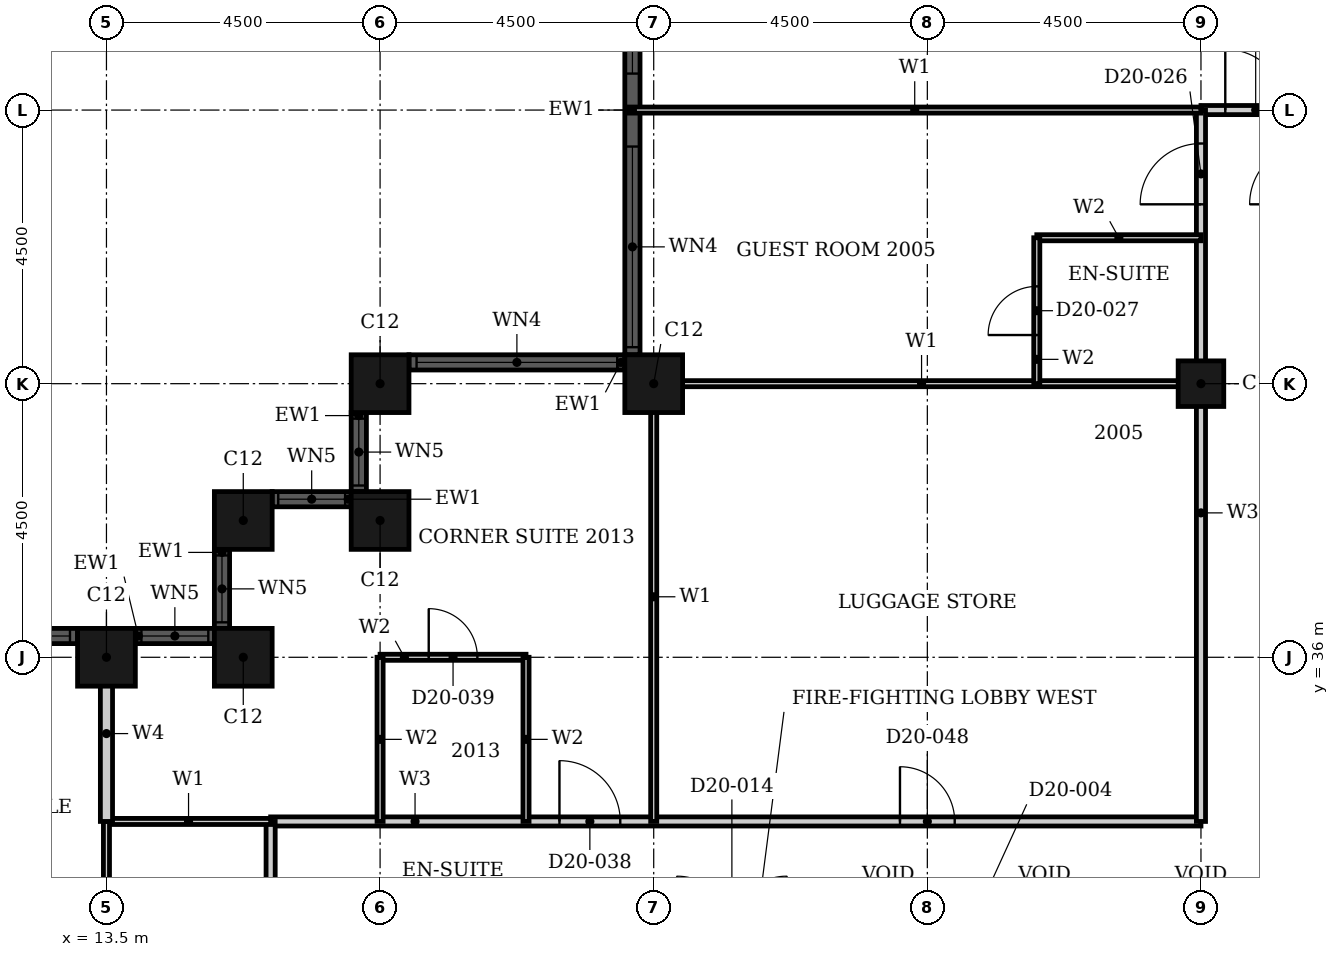
"""IFC4 building model, lengths in metres.
Left out: names, types, materials, properties, quantities, classifications, styles, units other than length and angle.
Written with IfcOpenShell. Run it as: python <this file> out.ifc"""

import sys

from ifc_helpers import new_model, si_unit, direction, frame, frame_2d, origin, origin_2d, place, context, subcontext, project, spatial, rectangle, hollow_rectangle, extrude, element, fill, save


model = new_model("IFC4")
c1 = context("Model", 3, precision=1e-05, world=origin(), true_north=direction((0.0, 1.0)))
c2 = subcontext(c1, "Body", "Model", "MODEL_VIEW")
j1 = project(units=[si_unit("LENGTHUNIT", "METRE"), si_unit("PLANEANGLEUNIT", "RADIAN")], contexts=[c1])
p1 = place(None, origin())
s1 = spatial("IfcSite", under=j1, at=p1, CompositionType="ELEMENT")
p2 = place(p1, origin())
s2 = spatial("IfcBuilding", under=s1, at=p2, CompositionType="ELEMENT")
p3 = place(p2, frame((0.0, 0.0, 85.2)))
s3 = spatial("IfcBuildingStorey", under=s2, at=p3, CompositionType="ELEMENT", Elevation=85.2)
for number, where, z_axis, x_axis in (
    (1, (22.5, 40.5, 0.0), (0.0, 0.0, 1.0), (1.0, 0.0, 0.0)),
    (2, (18.0, 40.5, 0.0), (0.0, 0.0, 1.0), (1.0, 0.0, 0.0)),
    (3, (18.0, 38.25, 0.0), (0.0, 0.0, 1.0), (1.0, 0.0, 0.0)),
    (4, (15.75, 38.25, 0.0), (0.0, 0.0, 1.0), (1.0, 0.0, 0.0)),
    (5, (15.75, 36.0, 0.0), (0.0, 0.0, 1.0), (1.0, 0.0, 0.0)),
    (6, (13.5, 36.0, 0.0), (0.0, 0.0, 1.0), (1.0, 0.0, 0.0)),
):
    element("IfcColumn", number, at=place(p3, frame(where, z_axis=z_axis, x_axis=x_axis)), inside=s3, PredefinedType="COLUMN", context=c2, shape_type="SweptSolid", body=[
        extrude(hollow_rectangle(XDim=0.95, YDim=0.95, WallThickness=0.03, at=origin_2d()), origin(), (0.0, 0.0, 1.0), 3.6),
    ])
p4 = place(p3, frame((31.5, 40.5, 0.0), z_axis=(0.0, 0.0, 1.0), x_axis=(1.0, 0.0, 0.0)))
e7 = element("IfcColumn", 7, at=p4, inside=s3, PredefinedType="COLUMN", context=c2, shape_type="SweptSolid", body=[
    extrude(hollow_rectangle(XDim=0.75, YDim=0.75, WallThickness=0.024, at=origin_2d()), origin(), (0.0, 0.0, 1.0), 3.6),
])
p5 = place(p3, frame((22.15, 49.025, 0.0), z_axis=(0.0, 0.0, 1.0), x_axis=(0.0, -1.0, 0.0)))
e8 = element("IfcWall", 8, at=p5, inside=s3, PredefinedType="SOLIDWALL", context=c2, shape_type="SweptSolid", body=[
    extrude(rectangle(XDim=8.05, YDim=0.25, at=frame_2d((4.025, 0.0))), origin(), (0.0, 0.0, 1.0), 3.6),
])
p6 = place(p5, frame((0.125, 0.0, 0.9)))
e9 = element("IfcOpeningElement", 9, at=p6, cuts=e8, PredefinedType="OPENING", context=c2, shape_type="SweptSolid", body=[
    extrude(rectangle(XDim=3.3, YDim=2.08, at=frame_2d((1.65, 1.04))), frame((0.0, 0.135, 0.0), z_axis=(0.0, -1.0, 0.0), x_axis=(1.0, 0.0, 0.0)), (0.0, 0.0, 1.0), 0.27),
])
p7 = place(p5, frame((4.625, 0.0, 0.9)))
e10 = element("IfcOpeningElement", 10, at=p7, cuts=e8, PredefinedType="OPENING", context=c2, shape_type="SweptSolid", body=[
    extrude(rectangle(XDim=3.3, YDim=2.08, at=frame_2d((1.65, 1.04))), frame((0.0, 0.135, 0.0), z_axis=(0.0, -1.0, 0.0), x_axis=(1.0, 0.0, 0.0)), (0.0, 0.0, 1.0), 0.27),
])
p8 = place(p3, frame((22.025, 40.85, 0.0), z_axis=(0.0, 0.0, 1.0), x_axis=(-1.0, 0.0, 0.0)))
e11 = element("IfcWall", 11, at=p8, inside=s3, PredefinedType="SOLIDWALL", context=c2, shape_type="SweptSolid", body=[
    extrude(rectangle(XDim=3.55, YDim=0.25, at=frame_2d((1.775, 0.0))), origin(), (0.0, 0.0, 1.0), 3.6),
])
p9 = place(p8, frame((0.125, 0.0, 0.9)))
e12 = element("IfcOpeningElement", 12, at=p9, cuts=e11, PredefinedType="OPENING", context=c2, shape_type="SweptSolid", body=[
    extrude(rectangle(XDim=3.3, YDim=2.08, at=frame_2d((1.65, 1.04))), frame((0.0, 0.135, 0.0), z_axis=(0.0, -1.0, 0.0), x_axis=(1.0, 0.0, 0.0)), (0.0, 0.0, 1.0), 0.27),
])
p10 = place(p3, frame((17.65, 40.025, 0.0), z_axis=(0.0, 0.0, 1.0), x_axis=(0.0, -1.0, 0.0)))
e13 = element("IfcWall", 13, at=p10, inside=s3, PredefinedType="SOLIDWALL", context=c2, shape_type="SweptSolid", body=[
    extrude(rectangle(XDim=1.3, YDim=0.25, at=frame_2d((0.65, 0.0))), origin(), (0.0, 0.0, 1.0), 3.6),
])
p11 = place(p10, frame((0.1, 0.0, 0.9)))
e14 = element("IfcOpeningElement", 14, at=p11, cuts=e13, PredefinedType="OPENING", context=c2, shape_type="SweptSolid", body=[
    extrude(rectangle(XDim=1.1, YDim=2.08, at=frame_2d((0.55, 1.04))), frame((0.0, 0.135, 0.0), z_axis=(0.0, -1.0, 0.0), x_axis=(1.0, 0.0, 0.0)), (0.0, 0.0, 1.0), 0.27),
])
p12 = place(p3, frame((17.525, 38.6, 0.0), z_axis=(0.0, 0.0, 1.0), x_axis=(-1.0, 0.0, 0.0)))
e15 = element("IfcWall", 15, at=p12, inside=s3, PredefinedType="SOLIDWALL", context=c2, shape_type="SweptSolid", body=[
    extrude(rectangle(XDim=1.3, YDim=0.25, at=frame_2d((0.65, 0.0))), origin(), (0.0, 0.0, 1.0), 3.6),
])
p13 = place(p12, frame((0.1, 0.0, 0.9)))
e16 = element("IfcOpeningElement", 16, at=p13, cuts=e15, PredefinedType="OPENING", context=c2, shape_type="SweptSolid", body=[
    extrude(rectangle(XDim=1.1, YDim=2.08, at=frame_2d((0.55, 1.04))), frame((0.0, 0.135, 0.0), z_axis=(0.0, -1.0, 0.0), x_axis=(1.0, 0.0, 0.0)), (0.0, 0.0, 1.0), 0.27),
])
p14 = place(p3, frame((15.4, 37.775, 0.0), z_axis=(0.0, 0.0, 1.0), x_axis=(0.0, -1.0, 0.0)))
e17 = element("IfcWall", 17, at=p14, inside=s3, PredefinedType="SOLIDWALL", context=c2, shape_type="SweptSolid", body=[
    extrude(rectangle(XDim=1.3, YDim=0.25, at=frame_2d((0.65, 0.0))), origin(), (0.0, 0.0, 1.0), 3.6),
])
p15 = place(p14, frame((0.1, 0.0, 0.9)))
e18 = element("IfcOpeningElement", 18, at=p15, cuts=e17, PredefinedType="OPENING", context=c2, shape_type="SweptSolid", body=[
    extrude(rectangle(XDim=1.1, YDim=2.08, at=frame_2d((0.55, 1.04))), frame((0.0, 0.135, 0.0), z_axis=(0.0, -1.0, 0.0), x_axis=(1.0, 0.0, 0.0)), (0.0, 0.0, 1.0), 0.27),
])
p16 = place(p3, frame((15.275, 36.35, 0.0), z_axis=(0.0, 0.0, 1.0), x_axis=(-1.0, 0.0, 0.0)))
e19 = element("IfcWall", 19, at=p16, inside=s3, PredefinedType="SOLIDWALL", context=c2, shape_type="SweptSolid", body=[
    extrude(rectangle(XDim=1.3, YDim=0.25, at=frame_2d((0.65, 0.0))), origin(), (0.0, 0.0, 1.0), 3.6),
])
p17 = place(p16, frame((0.1, 0.0, 0.9)))
e20 = element("IfcOpeningElement", 20, at=p17, cuts=e19, PredefinedType="OPENING", context=c2, shape_type="SweptSolid", body=[
    extrude(rectangle(XDim=1.1, YDim=2.08, at=frame_2d((0.55, 1.04))), frame((0.0, 0.135, 0.0), z_axis=(0.0, -1.0, 0.0), x_axis=(1.0, 0.0, 0.0)), (0.0, 0.0, 1.0), 0.27),
])
p18 = place(p3, frame((13.025, 36.35, 0.0), z_axis=(0.0, 0.0, 1.0), x_axis=(-1.0, 0.0, 0.0)))
e21 = element("IfcWall", 21, at=p18, inside=s3, PredefinedType="SOLIDWALL", context=c2, shape_type="SweptSolid", body=[
    extrude(rectangle(XDim=8.05, YDim=0.25, at=frame_2d((4.025, 0.0))), origin(), (0.0, 0.0, 1.0), 3.6),
])
p19 = place(p18, frame((0.125, 0.0, 0.9)))
e22 = element("IfcOpeningElement", 22, at=p19, cuts=e21, PredefinedType="OPENING", context=c2, shape_type="SweptSolid", body=[
    extrude(rectangle(XDim=3.3, YDim=2.08, at=frame_2d((1.65, 1.04))), frame((0.0, 0.135, 0.0), z_axis=(0.0, -1.0, 0.0), x_axis=(1.0, 0.0, 0.0)), (0.0, 0.0, 1.0), 0.27),
])
p20 = place(p18, frame((4.625, 0.0, 0.9)))
e23 = element("IfcOpeningElement", 23, at=p20, cuts=e21, PredefinedType="OPENING", context=c2, shape_type="SweptSolid", body=[
    extrude(rectangle(XDim=3.3, YDim=2.08, at=frame_2d((1.65, 1.04))), frame((0.0, 0.135, 0.0), z_axis=(0.0, -1.0, 0.0), x_axis=(1.0, 0.0, 0.0)), (0.0, 0.0, 1.0), 0.27),
])
p21 = place(p3, frame((16.2, 33.3, 0.0), z_axis=(0.0, 0.0, 1.0), x_axis=(1.0, 0.0, 0.0)))
e24 = element("IfcWall", 24, at=p21, inside=s3, PredefinedType="PARTITIONING", context=c2, shape_type="SweptSolid", body=[
    extrude(rectangle(XDim=15.3, YDim=0.15, at=frame_2d((7.65, 0.0))), origin(), (0.0, 0.0, 1.0), 3.3),
])
p22 = place(p21, frame((4.75, 0.0, 0.0)))
e25 = element("IfcOpeningElement", 25, at=p22, cuts=e24, PredefinedType="OPENING", context=c2, shape_type="SweptSolid", body=[
    extrude(rectangle(XDim=1.0, YDim=2.1, at=frame_2d((0.5, 1.05))), frame((0.0, 0.085, 0.0), z_axis=(0.0, -1.0, 0.0), x_axis=(1.0, 0.0, 0.0)), (0.0, 0.0, 1.0), 0.17),
])
p23 = place(p21, frame((10.35, 0.0, 0.0)))
e26 = element("IfcOpeningElement", 26, at=p23, cuts=e24, PredefinedType="OPENING", context=c2, shape_type="SweptSolid", body=[
    extrude(rectangle(XDim=0.9, YDim=2.1, at=frame_2d((0.45, 1.05))), frame((0.0, 0.085, 0.0), z_axis=(0.0, -1.0, 0.0), x_axis=(1.0, 0.0, 0.0)), (0.0, 0.0, 1.0), 0.17),
])
p24 = place(p3, frame((31.5, 45.0, 0.0), z_axis=(0.0, 0.0, 1.0), x_axis=(1.0, 0.0, 0.0)))
e27 = element("IfcWall", 27, at=p24, inside=s3, PredefinedType="PARTITIONING", context=c2, shape_type="SweptSolid", body=[
    extrude(rectangle(XDim=1.8, YDim=0.15, at=frame_2d((0.9, 0.0))), origin(), (0.0, 0.0, 1.0), 3.3),
])
p25 = place(p24, frame((0.4, 0.0, 0.0)))
e28 = element("IfcOpeningElement", 28, at=p25, cuts=e27, PredefinedType="OPENING", context=c2, shape_type="SweptSolid", body=[
    extrude(rectangle(XDim=1.0, YDim=2.1, at=frame_2d((0.5, 1.05))), frame((0.0, 0.085, 0.0), z_axis=(0.0, -1.0, 0.0), x_axis=(1.0, 0.0, 0.0)), (0.0, 0.0, 1.0), 0.17),
])
p26 = place(p3, frame((16.2, 27.0, 0.0), z_axis=(0.0, 0.0, 1.0), x_axis=(0.0, 1.0, 0.0)))
e29 = element("IfcWall", 29, at=p26, inside=s3, PredefinedType="PARTITIONING", context=c2, shape_type="SweptSolid", body=[
    extrude(rectangle(XDim=6.3, YDim=0.15, at=frame_2d((3.15, 0.0))), origin(), (0.0, 0.0, 1.0), 3.3),
])
p27 = place(p26, frame((2.525, 0.0, 0.0)))
e30 = element("IfcOpeningElement", 30, at=p27, cuts=e29, PredefinedType="OPENING", context=c2, shape_type="SweptSolid", body=[
    extrude(rectangle(XDim=0.95, YDim=2.1, at=frame_2d((0.475, 1.05))), frame((0.0, 0.085, 0.0), z_axis=(0.0, -1.0, 0.0), x_axis=(1.0, 0.0, 0.0)), (0.0, 0.0, 1.0), 0.17),
])
p28 = place(p3, frame((31.5, 33.3, 0.0), z_axis=(0.0, 0.0, 1.0), x_axis=(0.0, 1.0, 0.0)))
e31 = element("IfcWall", 31, at=p28, inside=s3, PredefinedType="PARTITIONING", context=c2, shape_type="SweptSolid", body=[
    extrude(rectangle(XDim=11.7, YDim=0.15, at=frame_2d((5.85, 0.0))), origin(), (0.0, 0.0, 1.0), 2.58),
])
p29 = place(p28, frame((10.15, 0.0, 0.0)))
e32 = element("IfcOpeningElement", 32, at=p29, cuts=e31, PredefinedType="OPENING", context=c2, shape_type="SweptSolid", body=[
    extrude(rectangle(XDim=1.0, YDim=2.1, at=frame_2d((0.5, 1.05))), frame((0.0, 0.085, 0.0), z_axis=(0.0, -1.0, 0.0), x_axis=(1.0, 0.0, 0.0)), (0.0, 0.0, 1.0), 0.17),
])
p30 = place(p3, frame((13.5, 33.3, 0.0), z_axis=(0.0, 0.0, 1.0), x_axis=(1.0, 0.0, 0.0)))
e33 = element("IfcWall", 33, at=p30, inside=s3, PredefinedType="PARTITIONING", context=c2, shape_type="SweptSolid", body=[
    extrude(rectangle(XDim=2.7, YDim=0.1, at=frame_2d((1.35, 0.0))), origin(), (0.0, 0.0, 1.0), 3.3),
])
p31 = place(p3, frame((22.31, 40.5, 0.0), z_axis=(0.0, 0.0, 1.0), x_axis=(1.0, 0.0, 0.0)))
e34 = element("IfcWall", 34, at=p31, inside=s3, PredefinedType="PARTITIONING", context=c2, shape_type="SweptSolid", body=[
    extrude(rectangle(XDim=9.19, YDim=0.1, at=frame_2d((4.595, 0.0))), origin(), (0.0, 0.0, 1.0), 2.38),
])
p32 = place(p3, frame((22.085, 45.0, 0.0), z_axis=(0.0, 0.0, 1.0), x_axis=(1.0, 0.0, 0.0)))
e35 = element("IfcWall", 35, at=p32, inside=s3, PredefinedType="PARTITIONING", context=c2, shape_type="SweptSolid", body=[
    extrude(rectangle(XDim=9.415, YDim=0.1, at=frame_2d((4.708, 0.0))), origin(), (0.0, 0.0, 1.0), 3.3),
])
p33 = place(p3, frame((13.5, 27.0, 0.0), z_axis=(0.0, 0.0, 1.0), x_axis=(0.0, 1.0, 0.0)))
e36 = element("IfcWall", 36, at=p33, inside=s3, PredefinedType="PARTITIONING", context=c2, shape_type="SweptSolid", body=[
    extrude(rectangle(XDim=6.3, YDim=0.1, at=frame_2d((3.15, 0.0))), origin(), (0.0, 0.0, 1.0), 2.38),
])
p34 = place(p3, frame((22.5, 33.3, 0.0), z_axis=(0.0, 0.0, 1.0), x_axis=(0.0, 1.0, 0.0)))
e37 = element("IfcWall", 37, at=p34, inside=s3, PredefinedType="PARTITIONING", context=c2, shape_type="SweptSolid", body=[
    extrude(rectangle(XDim=7.39, YDim=0.1, at=frame_2d((3.695, 0.0))), origin(), (0.0, 0.0, 1.0), 3.3),
])
p35 = place(p3, frame((13.5, 33.3, 0.0), z_axis=(0.0, 0.0, 1.0), x_axis=(0.0, 1.0, 0.0)))
e38 = element("IfcWall", 38, at=p35, inside=s3, PredefinedType="PARTITIONING", context=c2, shape_type="SweptSolid", body=[
    extrude(rectangle(XDim=2.89, YDim=0.2, at=frame_2d((1.445, 0.0))), origin(), (0.0, 0.0, 1.0), 2.38),
])
p36 = place(p3, frame((18.0, 36.0, 0.0), z_axis=(0.0, 0.0, 1.0), x_axis=(1.0, 0.0, 0.0)))
e39 = element("IfcWall", 39, at=p36, inside=s3, PredefinedType="PARTITIONING", context=c2, shape_type="SweptSolid", body=[
    extrude(rectangle(XDim=2.4, YDim=0.1, at=frame_2d((1.2, 0.0))), origin(), (0.0, 0.0, 1.0), 3.3),
])
p37 = place(p36, frame((0.8, 0.0, 0.0)))
e40 = element("IfcOpeningElement", 40, at=p37, cuts=e39, PredefinedType="OPENING", context=c2, shape_type="SweptSolid", body=[
    extrude(rectangle(XDim=0.8, YDim=2.1, at=frame_2d((0.4, 1.05))), frame((0.0, 0.06, 0.0), z_axis=(0.0, -1.0, 0.0), x_axis=(1.0, 0.0, 0.0)), (0.0, 0.0, 1.0), 0.12),
])
for number, where, z_axis, x_axis in (
    (41, (28.8, 42.9, 0.0), (0.0, 0.0, 1.0), (1.0, 0.0, 0.0)),
    (42, (18.0, 33.3, 0.0), (0.0, 0.0, 1.0), (0.0, 1.0, 0.0)),
    (43, (20.4, 33.3, 0.0), (0.0, 0.0, 1.0), (0.0, 1.0, 0.0)),
):
    element("IfcWall", number, at=place(p3, frame(where, z_axis=z_axis, x_axis=x_axis)), inside=s3, PredefinedType="PARTITIONING", context=c2, shape_type="SweptSolid", body=[
        extrude(rectangle(XDim=2.7, YDim=0.1, at=frame_2d((1.35, 0.0))), origin(), (0.0, 0.0, 1.0), 3.3),
    ])
p38 = place(p3, frame((28.8, 40.5, 0.0), z_axis=(0.0, 0.0, 1.0), x_axis=(0.0, 1.0, 0.0)))
e44 = element("IfcWall", 44, at=p38, inside=s3, PredefinedType="PARTITIONING", context=c2, shape_type="SweptSolid", body=[
    extrude(rectangle(XDim=2.4, YDim=0.1, at=frame_2d((1.2, 0.0))), origin(), (0.0, 0.0, 1.0), 3.3),
])
p39 = place(p38, frame((0.8, 0.0, 0.0)))
e45 = element("IfcOpeningElement", 45, at=p39, cuts=e44, PredefinedType="OPENING", context=c2, shape_type="SweptSolid", body=[
    extrude(rectangle(XDim=0.8, YDim=2.1, at=frame_2d((0.4, 1.05))), frame((0.0, 0.06, 0.0), z_axis=(0.0, -1.0, 0.0), x_axis=(1.0, 0.0, 0.0)), (0.0, 0.0, 1.0), 0.12),
])
p40 = place(p6, origin())
e46 = element("IfcWindow", 46, at=p40, inside=s3, PartitioningType="SINGLE_PANEL", PredefinedType="WINDOW", context=c2, shape_type="SweptSolid", body=[
    extrude(rectangle(XDim=3.3, YDim=2.08, at=frame_2d((1.65, 1.04))), frame((0.0, 0.03, 0.0), z_axis=(0.0, -1.0, 0.0), x_axis=(1.0, 0.0, 0.0)), (0.0, 0.0, 1.0), 0.06),
])
fill(e9, e46)
p41 = place(p7, origin())
e47 = element("IfcWindow", 47, at=p41, inside=s3, PartitioningType="SINGLE_PANEL", PredefinedType="WINDOW", context=c2, shape_type="SweptSolid", body=[
    extrude(rectangle(XDim=3.3, YDim=2.08, at=frame_2d((1.65, 1.04))), frame((0.0, 0.03, 0.0), z_axis=(0.0, -1.0, 0.0), x_axis=(1.0, 0.0, 0.0)), (0.0, 0.0, 1.0), 0.06),
])
fill(e10, e47)
p42 = place(p9, origin())
e48 = element("IfcWindow", 48, at=p42, inside=s3, PartitioningType="SINGLE_PANEL", PredefinedType="WINDOW", context=c2, shape_type="SweptSolid", body=[
    extrude(rectangle(XDim=3.3, YDim=2.08, at=frame_2d((1.65, 1.04))), frame((0.0, 0.03, 0.0), z_axis=(0.0, -1.0, 0.0), x_axis=(1.0, 0.0, 0.0)), (0.0, 0.0, 1.0), 0.06),
])
fill(e12, e48)
p43 = place(p11, origin())
e49 = element("IfcWindow", 49, at=p43, inside=s3, PartitioningType="SINGLE_PANEL", PredefinedType="WINDOW", context=c2, shape_type="SweptSolid", body=[
    extrude(rectangle(XDim=1.1, YDim=2.08, at=frame_2d((0.55, 1.04))), frame((0.0, 0.03, 0.0), z_axis=(0.0, -1.0, 0.0), x_axis=(1.0, 0.0, 0.0)), (0.0, 0.0, 1.0), 0.06),
])
fill(e14, e49)
p44 = place(p13, origin())
e50 = element("IfcWindow", 50, at=p44, inside=s3, PartitioningType="SINGLE_PANEL", PredefinedType="WINDOW", context=c2, shape_type="SweptSolid", body=[
    extrude(rectangle(XDim=1.1, YDim=2.08, at=frame_2d((0.55, 1.04))), frame((0.0, 0.03, 0.0), z_axis=(0.0, -1.0, 0.0), x_axis=(1.0, 0.0, 0.0)), (0.0, 0.0, 1.0), 0.06),
])
fill(e16, e50)
p45 = place(p15, origin())
e51 = element("IfcWindow", 51, at=p45, inside=s3, PartitioningType="SINGLE_PANEL", PredefinedType="WINDOW", context=c2, shape_type="SweptSolid", body=[
    extrude(rectangle(XDim=1.1, YDim=2.08, at=frame_2d((0.55, 1.04))), frame((0.0, 0.03, 0.0), z_axis=(0.0, -1.0, 0.0), x_axis=(1.0, 0.0, 0.0)), (0.0, 0.0, 1.0), 0.06),
])
fill(e18, e51)
p46 = place(p17, origin())
e52 = element("IfcWindow", 52, at=p46, inside=s3, PartitioningType="SINGLE_PANEL", PredefinedType="WINDOW", context=c2, shape_type="SweptSolid", body=[
    extrude(rectangle(XDim=1.1, YDim=2.08, at=frame_2d((0.55, 1.04))), frame((0.0, 0.03, 0.0), z_axis=(0.0, -1.0, 0.0), x_axis=(1.0, 0.0, 0.0)), (0.0, 0.0, 1.0), 0.06),
])
fill(e20, e52)
p47 = place(p19, origin())
e53 = element("IfcWindow", 53, at=p47, inside=s3, PartitioningType="SINGLE_PANEL", PredefinedType="WINDOW", context=c2, shape_type="SweptSolid", body=[
    extrude(rectangle(XDim=3.3, YDim=2.08, at=frame_2d((1.65, 1.04))), frame((0.0, 0.03, 0.0), z_axis=(0.0, -1.0, 0.0), x_axis=(1.0, 0.0, 0.0)), (0.0, 0.0, 1.0), 0.06),
])
fill(e22, e53)
p48 = place(p29, origin())
e54 = element("IfcDoor", 54, at=p48, inside=s3, OperationType="SINGLE_SWING_RIGHT", PredefinedType="DOOR", context=c2, shape_type="SweptSolid", body=[
    extrude(rectangle(XDim=1.0, YDim=2.1, at=frame_2d((0.5, 1.05))), frame((0.0, 0.025, 0.0), z_axis=(0.0, -1.0, 0.0), x_axis=(1.0, 0.0, 0.0)), (0.0, 0.0, 1.0), 0.05),
])
fill(e32, e54)
p49 = place(p39, origin())
e55 = element("IfcDoor", 55, at=p49, inside=s3, OperationType="SINGLE_SWING_LEFT", PredefinedType="DOOR", context=c2, shape_type="SweptSolid", body=[
    extrude(rectangle(XDim=0.8, YDim=2.1, at=frame_2d((0.4, 1.05))), frame((0.0, 0.025, 0.0), z_axis=(0.0, -1.0, 0.0), x_axis=(1.0, 0.0, 0.0)), (0.0, 0.0, 1.0), 0.05),
])
fill(e45, e55)
p50 = place(p25, origin())
e56 = element("IfcDoor", 56, at=p50, inside=s3, OperationType="SINGLE_SWING_RIGHT", PredefinedType="DOOR", context=c2, shape_type="SweptSolid", body=[
    extrude(rectangle(XDim=1.0, YDim=2.1, at=frame_2d((0.5, 1.05))), frame((0.0, 0.025, 0.0), z_axis=(0.0, -1.0, 0.0), x_axis=(1.0, 0.0, 0.0)), (0.0, 0.0, 1.0), 0.05),
])
fill(e28, e56)
p51 = place(p22, origin())
e57 = element("IfcDoor", 57, at=p51, inside=s3, OperationType="SINGLE_SWING_RIGHT", PredefinedType="DOOR", context=c2, shape_type="SweptSolid", body=[
    extrude(rectangle(XDim=1.0, YDim=2.1, at=frame_2d((0.5, 1.05))), frame((0.0, 0.025, 0.0), z_axis=(0.0, -1.0, 0.0), x_axis=(1.0, 0.0, 0.0)), (0.0, 0.0, 1.0), 0.05),
])
fill(e25, e57)
p52 = place(p37, origin())
e58 = element("IfcDoor", 58, at=p52, inside=s3, OperationType="SINGLE_SWING_LEFT", PredefinedType="DOOR", context=c2, shape_type="SweptSolid", body=[
    extrude(rectangle(XDim=0.8, YDim=2.1, at=frame_2d((0.4, 1.05))), frame((0.0, 0.025, 0.0), z_axis=(0.0, -1.0, 0.0), x_axis=(1.0, 0.0, 0.0)), (0.0, 0.0, 1.0), 0.05),
])
fill(e40, e58)
p53 = place(p23, origin())
e59 = element("IfcDoor", 59, at=p53, inside=s3, OperationType="SINGLE_SWING_LEFT", PredefinedType="DOOR", context=c2, shape_type="SweptSolid", body=[
    extrude(rectangle(XDim=0.9, YDim=2.1, at=frame_2d((0.45, 1.05))), frame((0.0, 0.025, 0.0), z_axis=(0.0, -1.0, 0.0), x_axis=(1.0, 0.0, 0.0)), (0.0, 0.0, 1.0), 0.05),
])
fill(e26, e59)
save(model, sys.argv[1])
